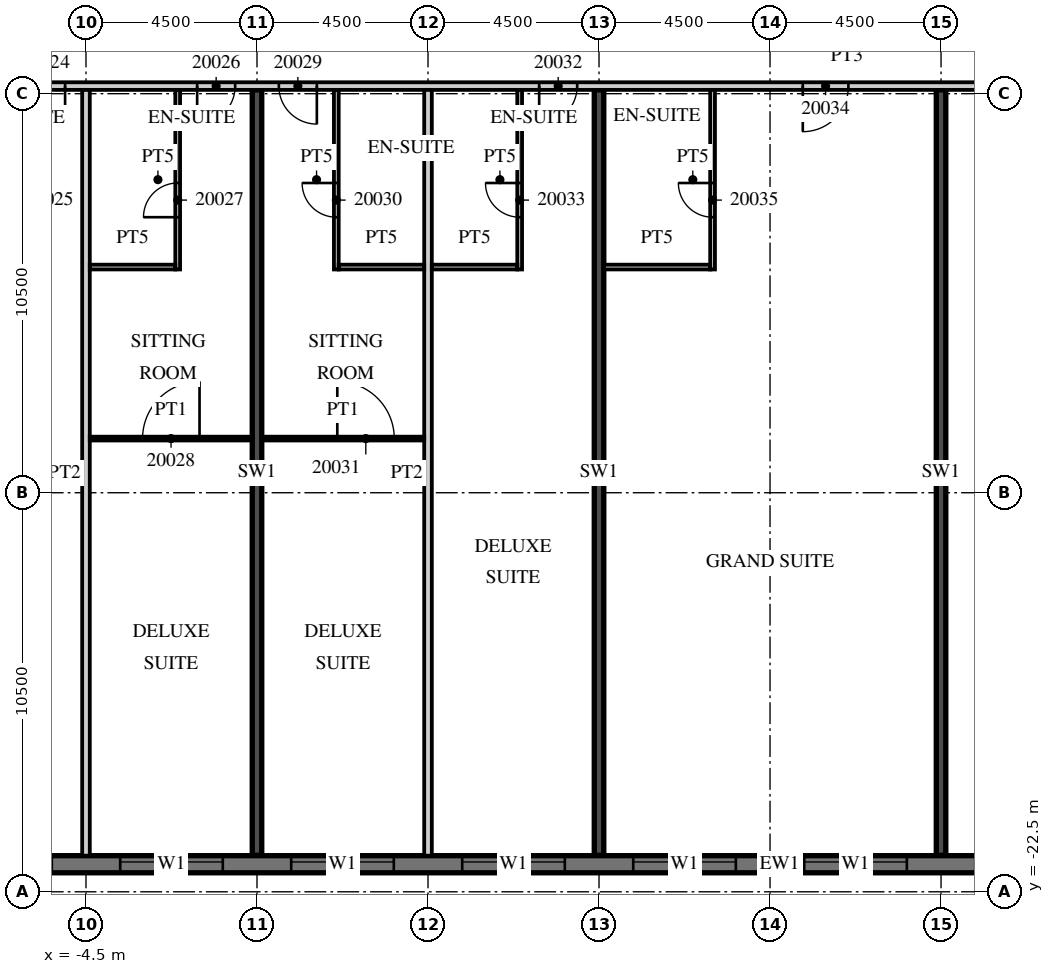
"""IFC4 building model, lengths in metres.
Left out: names, types, materials, properties, quantities, classifications, styles, units other than length and angle.
Written with IfcOpenShell. Run it as: python <this file> out.ifc"""

import sys

from ifc_helpers import new_model, si_unit, direction, frame, frame_2d, origin, place, context, subcontext, project, spatial, rectangle, extrude, element, fill, save


model = new_model("IFC4")
c1 = context("Model", 3, precision=1e-05, world=origin(), true_north=direction((0.0, 1.0)))
c2 = subcontext(c1, "Body", "Model", "MODEL_VIEW")
j1 = project(units=[si_unit("LENGTHUNIT", "METRE"), si_unit("PLANEANGLEUNIT", "RADIAN")], contexts=[c1])
p1 = place(None, origin())
s1 = spatial("IfcSite", under=j1, at=p1, CompositionType="ELEMENT")
p2 = place(p1, origin())
s2 = spatial("IfcBuilding", under=s1, at=p2, CompositionType="ELEMENT")
p3 = place(p2, frame((0.0, 0.0, 96.3)))
s3 = spatial("IfcBuildingStorey", under=s2, at=p3, CompositionType="ELEMENT", Elevation=96.3)
for number, where, z_axis, x_axis in (
    (1, (0.0, -21.54, 0.0), (0.0, 0.0, 1.0), (0.0, 1.0, 0.0)),
    (2, (9.0, -21.54, 0.0), (0.0, 0.0, 1.0), (0.0, 1.0, 0.0)),
    (3, (18.0, -21.54, 0.0), (0.0, 0.0, 1.0), (0.0, 1.0, 0.0)),
):
    element("IfcWall", number, at=place(p3, frame(where, z_axis=z_axis, x_axis=x_axis)), inside=s3, PredefinedType="SHEAR", context=c2, shape_type="SweptSolid", body=[
        extrude(rectangle(XDim=20.14, YDim=0.25, at=frame_2d((10.07, 0.0))), origin(), (0.0, 0.0, 1.0), 3.0),
    ])
p4 = place(p3, frame((-13.5, -21.775, 0.0), z_axis=(0.0, 0.0, 1.0), x_axis=(1.0, 0.0, 0.0)))
e4 = element("IfcWall", 4, at=p4, inside=s3, PredefinedType="SOLIDWALL", context=c2, shape_type="SweptSolid", body=[
    extrude(rectangle(XDim=54.5, YDim=0.45, at=frame_2d((27.25, 0.0))), origin(), (0.0, 0.0, 1.0), 3.0),
])
p5 = place(p4, frame((0.9, 0.0, 0.45)))
e5 = element("IfcOpeningElement", 5, at=p5, cuts=e4, PredefinedType="OPENING", context=c2, shape_type="SweptSolid", body=[
    extrude(rectangle(XDim=2.7, YDim=2.25, at=frame_2d((1.35, 1.125))), frame((0.0, 0.235, 0.0), z_axis=(0.0, -1.0, 0.0), x_axis=(1.0, 0.0, 0.0)), (0.0, 0.0, 1.0), 0.47),
])
p6 = place(p4, frame((5.4, 0.0, 0.45)))
e6 = element("IfcOpeningElement", 6, at=p6, cuts=e4, PredefinedType="OPENING", context=c2, shape_type="SweptSolid", body=[
    extrude(rectangle(XDim=2.7, YDim=2.25, at=frame_2d((1.35, 1.125))), frame((0.0, 0.235, 0.0), z_axis=(0.0, -1.0, 0.0), x_axis=(1.0, 0.0, 0.0)), (0.0, 0.0, 1.0), 0.47),
])
p7 = place(p4, frame((9.9, 0.0, 0.45)))
e7 = element("IfcOpeningElement", 7, at=p7, cuts=e4, PredefinedType="OPENING", context=c2, shape_type="SweptSolid", body=[
    extrude(rectangle(XDim=2.7, YDim=2.25, at=frame_2d((1.35, 1.125))), frame((0.0, 0.235, 0.0), z_axis=(0.0, -1.0, 0.0), x_axis=(1.0, 0.0, 0.0)), (0.0, 0.0, 1.0), 0.47),
])
p8 = place(p4, frame((14.4, 0.0, 0.45)))
e8 = element("IfcOpeningElement", 8, at=p8, cuts=e4, PredefinedType="OPENING", context=c2, shape_type="SweptSolid", body=[
    extrude(rectangle(XDim=2.7, YDim=2.25, at=frame_2d((1.35, 1.125))), frame((0.0, 0.235, 0.0), z_axis=(0.0, -1.0, 0.0), x_axis=(1.0, 0.0, 0.0)), (0.0, 0.0, 1.0), 0.47),
])
p9 = place(p4, frame((18.9, 0.0, 0.45)))
e9 = element("IfcOpeningElement", 9, at=p9, cuts=e4, PredefinedType="OPENING", context=c2, shape_type="SweptSolid", body=[
    extrude(rectangle(XDim=2.7, YDim=2.25, at=frame_2d((1.35, 1.125))), frame((0.0, 0.235, 0.0), z_axis=(0.0, -1.0, 0.0), x_axis=(1.0, 0.0, 0.0)), (0.0, 0.0, 1.0), 0.47),
])
p10 = place(p4, frame((23.4, 0.0, 0.45)))
e10 = element("IfcOpeningElement", 10, at=p10, cuts=e4, PredefinedType="OPENING", context=c2, shape_type="SweptSolid", body=[
    extrude(rectangle(XDim=2.7, YDim=2.25, at=frame_2d((1.35, 1.125))), frame((0.0, 0.235, 0.0), z_axis=(0.0, -1.0, 0.0), x_axis=(1.0, 0.0, 0.0)), (0.0, 0.0, 1.0), 0.47),
])
p11 = place(p4, frame((27.9, 0.0, 0.45)))
e11 = element("IfcOpeningElement", 11, at=p11, cuts=e4, PredefinedType="OPENING", context=c2, shape_type="SweptSolid", body=[
    extrude(rectangle(XDim=2.7, YDim=2.25, at=frame_2d((1.35, 1.125))), frame((0.0, 0.235, 0.0), z_axis=(0.0, -1.0, 0.0), x_axis=(1.0, 0.0, 0.0)), (0.0, 0.0, 1.0), 0.47),
])
p12 = place(p4, frame((32.4, 0.0, 0.45)))
e12 = element("IfcOpeningElement", 12, at=p12, cuts=e4, PredefinedType="OPENING", context=c2, shape_type="SweptSolid", body=[
    extrude(rectangle(XDim=2.7, YDim=2.25, at=frame_2d((1.35, 1.125))), frame((0.0, 0.235, 0.0), z_axis=(0.0, -1.0, 0.0), x_axis=(1.0, 0.0, 0.0)), (0.0, 0.0, 1.0), 0.47),
])
p13 = place(p4, frame((36.9, 0.0, 0.45)))
e13 = element("IfcOpeningElement", 13, at=p13, cuts=e4, PredefinedType="OPENING", context=c2, shape_type="SweptSolid", body=[
    extrude(rectangle(XDim=2.7, YDim=2.25, at=frame_2d((1.35, 1.125))), frame((0.0, 0.235, 0.0), z_axis=(0.0, -1.0, 0.0), x_axis=(1.0, 0.0, 0.0)), (0.0, 0.0, 1.0), 0.47),
])
p14 = place(p4, frame((41.4, 0.0, 0.45)))
e14 = element("IfcOpeningElement", 14, at=p14, cuts=e4, PredefinedType="OPENING", context=c2, shape_type="SweptSolid", body=[
    extrude(rectangle(XDim=2.7, YDim=2.25, at=frame_2d((1.35, 1.125))), frame((0.0, 0.235, 0.0), z_axis=(0.0, -1.0, 0.0), x_axis=(1.0, 0.0, 0.0)), (0.0, 0.0, 1.0), 0.47),
])
p15 = place(p4, frame((45.9, 0.0, 0.45)))
e15 = element("IfcOpeningElement", 15, at=p15, cuts=e4, PredefinedType="OPENING", context=c2, shape_type="SweptSolid", body=[
    extrude(rectangle(XDim=2.7, YDim=2.25, at=frame_2d((1.35, 1.125))), frame((0.0, 0.235, 0.0), z_axis=(0.0, -1.0, 0.0), x_axis=(1.0, 0.0, 0.0)), (0.0, 0.0, 1.0), 0.47),
])
p16 = place(p4, frame((50.4, 0.0, 0.45)))
e16 = element("IfcOpeningElement", 16, at=p16, cuts=e4, PredefinedType="OPENING", context=c2, shape_type="SweptSolid", body=[
    extrude(rectangle(XDim=2.7, YDim=2.25, at=frame_2d((1.35, 1.125))), frame((0.0, 0.235, 0.0), z_axis=(0.0, -1.0, 0.0), x_axis=(1.0, 0.0, 0.0)), (0.0, 0.0, 1.0), 0.47),
])
p17 = place(p3, frame((-13.5, -1.3, 0.0), z_axis=(0.0, 0.0, 1.0), x_axis=(1.0, 0.0, 0.0)))
e17 = element("IfcWall", 17, at=p17, inside=s3, PredefinedType="PARTITIONING", context=c2, shape_type="SweptSolid", body=[
    extrude(rectangle(XDim=58.05, YDim=0.2, at=frame_2d((29.025, 0.0))), origin(), (0.0, 0.0, 1.0), 3.0),
])
p18 = place(p17, frame((0.575, 0.0, 0.0)))
e18 = element("IfcOpeningElement", 18, at=p18, cuts=e17, PredefinedType="OPENING", context=c2, shape_type="SweptSolid", body=[
    extrude(rectangle(XDim=1.0, YDim=2.1, at=frame_2d((0.5, 1.05))), frame((0.0, 0.11, 0.0), z_axis=(0.0, -1.0, 0.0), x_axis=(1.0, 0.0, 0.0)), (0.0, 0.0, 1.0), 0.22),
])
p19 = place(p17, frame((7.45, 0.0, 0.0)))
e19 = element("IfcOpeningElement", 19, at=p19, cuts=e17, PredefinedType="OPENING", context=c2, shape_type="SweptSolid", body=[
    extrude(rectangle(XDim=1.0, YDim=2.1, at=frame_2d((0.5, 1.05))), frame((0.0, 0.11, 0.0), z_axis=(0.0, -1.0, 0.0), x_axis=(1.0, 0.0, 0.0)), (0.0, 0.0, 1.0), 0.22),
])
p20 = place(p17, frame((11.925, 0.0, 0.0)))
e20 = element("IfcOpeningElement", 20, at=p20, cuts=e17, PredefinedType="OPENING", context=c2, shape_type="SweptSolid", body=[
    extrude(rectangle(XDim=1.0, YDim=2.1, at=frame_2d((0.5, 1.05))), frame((0.0, 0.11, 0.0), z_axis=(0.0, -1.0, 0.0), x_axis=(1.0, 0.0, 0.0)), (0.0, 0.0, 1.0), 0.22),
])
p21 = place(p17, frame((14.075, 0.0, 0.0)))
e21 = element("IfcOpeningElement", 21, at=p21, cuts=e17, PredefinedType="OPENING", context=c2, shape_type="SweptSolid", body=[
    extrude(rectangle(XDim=1.0, YDim=2.1, at=frame_2d((0.5, 1.05))), frame((0.0, 0.11, 0.0), z_axis=(0.0, -1.0, 0.0), x_axis=(1.0, 0.0, 0.0)), (0.0, 0.0, 1.0), 0.22),
])
p22 = place(p17, frame((20.925, 0.0, 0.0)))
e22 = element("IfcOpeningElement", 22, at=p22, cuts=e17, PredefinedType="OPENING", context=c2, shape_type="SweptSolid", body=[
    extrude(rectangle(XDim=1.0, YDim=2.1, at=frame_2d((0.5, 1.05))), frame((0.0, 0.11, 0.0), z_axis=(0.0, -1.0, 0.0), x_axis=(1.0, 0.0, 0.0)), (0.0, 0.0, 1.0), 0.22),
])
p23 = place(p17, frame((27.862, 0.0, 0.0)))
e23 = element("IfcOpeningElement", 23, at=p23, cuts=e17, PredefinedType="OPENING", context=c2, shape_type="SweptSolid", body=[
    extrude(rectangle(XDim=1.2, YDim=2.1, at=frame_2d((0.6, 1.05))), frame((0.0, 0.11, 0.0), z_axis=(0.0, -1.0, 0.0), x_axis=(1.0, 0.0, 0.0)), (0.0, 0.0, 1.0), 0.22),
])
p24 = place(p17, frame((33.938, 0.0, 0.0)))
e24 = element("IfcOpeningElement", 24, at=p24, cuts=e17, PredefinedType="OPENING", context=c2, shape_type="SweptSolid", body=[
    extrude(rectangle(XDim=1.2, YDim=2.1, at=frame_2d((0.6, 1.05))), frame((0.0, 0.11, 0.0), z_axis=(0.0, -1.0, 0.0), x_axis=(1.0, 0.0, 0.0)), (0.0, 0.0, 1.0), 0.22),
])
p25 = place(p17, frame((45.862, 0.0, 0.0)))
e25 = element("IfcOpeningElement", 25, at=p25, cuts=e17, PredefinedType="OPENING", context=c2, shape_type="SweptSolid", body=[
    extrude(rectangle(XDim=1.2, YDim=2.1, at=frame_2d((0.6, 1.05))), frame((0.0, 0.11, 0.0), z_axis=(0.0, -1.0, 0.0), x_axis=(1.0, 0.0, 0.0)), (0.0, 0.0, 1.0), 0.22),
])
p26 = place(p17, frame((52.425, 0.0, 0.0)))
e26 = element("IfcOpeningElement", 26, at=p26, cuts=e17, PredefinedType="OPENING", context=c2, shape_type="SweptSolid", body=[
    extrude(rectangle(XDim=1.0, YDim=2.1, at=frame_2d((0.5, 1.05))), frame((0.0, 0.11, 0.0), z_axis=(0.0, -1.0, 0.0), x_axis=(1.0, 0.0, 0.0)), (0.0, 0.0, 1.0), 0.22),
])
p27 = place(p17, frame((56.525, 0.0, 0.0)))
e27 = element("IfcOpeningElement", 27, at=p27, cuts=e17, PredefinedType="OPENING", context=c2, shape_type="SweptSolid", body=[
    extrude(rectangle(XDim=1.0, YDim=2.1, at=frame_2d((0.5, 1.05))), frame((0.0, 0.11, 0.0), z_axis=(0.0, -1.0, 0.0), x_axis=(1.0, 0.0, 0.0)), (0.0, 0.0, 1.0), 0.22),
])
p28 = place(p3, frame((-4.5, -21.55, 0.0), z_axis=(0.0, 0.0, 1.0), x_axis=(0.0, 1.0, 0.0)))
e28 = element("IfcWall", 28, at=p28, inside=s3, PredefinedType="PARTITIONING", context=c2, shape_type="SweptSolid", body=[
    extrude(rectangle(XDim=20.15, YDim=0.2, at=frame_2d((10.075, 0.0))), origin(), (0.0, 0.0, 1.0), 3.0),
])
p29 = place(p3, frame((-2.087, -6.125, 0.0), z_axis=(0.0, 0.0, 1.0), x_axis=(0.0, 1.0, 0.0)))
e29 = element("IfcWall", 29, at=p29, inside=s3, PredefinedType="PARTITIONING", context=c2, shape_type="SweptSolid", body=[
    extrude(rectangle(XDim=4.725, YDim=0.125, at=frame_2d((2.363, 0.0))), origin(), (0.0, 0.0, 1.0), 3.0),
])
p30 = place(p29, frame((1.375, 0.0, 0.0)))
e30 = element("IfcOpeningElement", 30, at=p30, cuts=e29, PredefinedType="OPENING", context=c2, shape_type="SweptSolid", body=[
    extrude(rectangle(XDim=0.9, YDim=2.1, at=frame_2d((0.45, 1.05))), frame((0.0, 0.073, 0.0), z_axis=(0.0, -1.0, 0.0), x_axis=(1.0, 0.0, 0.0)), (0.0, 0.0, 1.0), 0.145),
])
p31 = place(p3, frame((-4.4, -6.062, 0.0), z_axis=(0.0, 0.0, 1.0), x_axis=(1.0, 0.0, 0.0)))
e31 = element("IfcWall", 31, at=p31, inside=s3, PredefinedType="PARTITIONING", context=c2, shape_type="SweptSolid", body=[
    extrude(rectangle(XDim=2.25, YDim=0.125, at=frame_2d((1.125, 0.0))), origin(), (0.0, 0.0, 1.0), 3.0),
])
p32 = place(p3, frame((-4.4, -10.575, 0.0), z_axis=(0.0, 0.0, 1.0), x_axis=(1.0, 0.0, 0.0)))
e32 = element("IfcWall", 32, at=p32, inside=s3, PredefinedType="PARTITIONING", context=c2, shape_type="SweptSolid", body=[
    extrude(rectangle(XDim=4.275, YDim=0.1, at=frame_2d((2.137, 0.0))), origin(), (0.0, 0.0, 1.0), 3.0),
])
p33 = place(p32, frame((1.388, 0.0, 0.0)))
e33 = element("IfcOpeningElement", 33, at=p33, cuts=e32, PredefinedType="OPENING", context=c2, shape_type="SweptSolid", body=[
    extrude(rectangle(XDim=1.5, YDim=2.1, at=frame_2d((0.75, 1.05))), frame((0.0, 0.06, 0.0), z_axis=(0.0, -1.0, 0.0), x_axis=(1.0, 0.0, 0.0)), (0.0, 0.0, 1.0), 0.12),
])
p34 = place(p3, frame((4.5, -21.55, 0.0), z_axis=(0.0, 0.0, 1.0), x_axis=(0.0, 1.0, 0.0)))
e34 = element("IfcWall", 34, at=p34, inside=s3, PredefinedType="PARTITIONING", context=c2, shape_type="SweptSolid", body=[
    extrude(rectangle(XDim=20.15, YDim=0.2, at=frame_2d((10.075, 0.0))), origin(), (0.0, 0.0, 1.0), 3.0),
])
p35 = place(p3, frame((2.087, -6.125, 0.0), z_axis=(0.0, 0.0, 1.0), x_axis=(0.0, 1.0, 0.0)))
e35 = element("IfcWall", 35, at=p35, inside=s3, PredefinedType="PARTITIONING", context=c2, shape_type="SweptSolid", body=[
    extrude(rectangle(XDim=4.725, YDim=0.125, at=frame_2d((2.363, 0.0))), origin(), (0.0, 0.0, 1.0), 3.0),
])
p36 = place(p35, frame((1.375, 0.0, 0.0)))
e36 = element("IfcOpeningElement", 36, at=p36, cuts=e35, PredefinedType="OPENING", context=c2, shape_type="SweptSolid", body=[
    extrude(rectangle(XDim=0.9, YDim=2.1, at=frame_2d((0.45, 1.05))), frame((0.0, 0.073, 0.0), z_axis=(0.0, -1.0, 0.0), x_axis=(1.0, 0.0, 0.0)), (0.0, 0.0, 1.0), 0.145),
])
p37 = place(p3, frame((2.15, -6.062, 0.0), z_axis=(0.0, 0.0, 1.0), x_axis=(1.0, 0.0, 0.0)))
e37 = element("IfcWall", 37, at=p37, inside=s3, PredefinedType="PARTITIONING", context=c2, shape_type="SweptSolid", body=[
    extrude(rectangle(XDim=2.25, YDim=0.125, at=frame_2d((1.125, 0.0))), origin(), (0.0, 0.0, 1.0), 3.0),
])
p38 = place(p3, frame((0.125, -10.575, 0.0), z_axis=(0.0, 0.0, 1.0), x_axis=(1.0, 0.0, 0.0)))
e38 = element("IfcWall", 38, at=p38, inside=s3, PredefinedType="PARTITIONING", context=c2, shape_type="SweptSolid", body=[
    extrude(rectangle(XDim=4.275, YDim=0.1, at=frame_2d((2.137, 0.0))), origin(), (0.0, 0.0, 1.0), 3.0),
])
p39 = place(p38, frame((1.988, 0.0, 0.0)))
e39 = element("IfcOpeningElement", 39, at=p39, cuts=e38, PredefinedType="OPENING", context=c2, shape_type="SweptSolid", body=[
    extrude(rectangle(XDim=1.5, YDim=2.1, at=frame_2d((0.75, 1.05))), frame((0.0, 0.06, 0.0), z_axis=(0.0, -1.0, 0.0), x_axis=(1.0, 0.0, 0.0)), (0.0, 0.0, 1.0), 0.12),
])
p40 = place(p3, frame((6.912, -6.125, 0.0), z_axis=(0.0, 0.0, 1.0), x_axis=(0.0, 1.0, 0.0)))
e40 = element("IfcWall", 40, at=p40, inside=s3, PredefinedType="PARTITIONING", context=c2, shape_type="SweptSolid", body=[
    extrude(rectangle(XDim=4.725, YDim=0.125, at=frame_2d((2.363, 0.0))), origin(), (0.0, 0.0, 1.0), 3.0),
])
p41 = place(p40, frame((1.375, 0.0, 0.0)))
e41 = element("IfcOpeningElement", 41, at=p41, cuts=e40, PredefinedType="OPENING", context=c2, shape_type="SweptSolid", body=[
    extrude(rectangle(XDim=0.9, YDim=2.1, at=frame_2d((0.45, 1.05))), frame((0.0, 0.073, 0.0), z_axis=(0.0, -1.0, 0.0), x_axis=(1.0, 0.0, 0.0)), (0.0, 0.0, 1.0), 0.145),
])
p42 = place(p3, frame((4.6, -6.062, 0.0), z_axis=(0.0, 0.0, 1.0), x_axis=(1.0, 0.0, 0.0)))
e42 = element("IfcWall", 42, at=p42, inside=s3, PredefinedType="PARTITIONING", context=c2, shape_type="SweptSolid", body=[
    extrude(rectangle(XDim=2.25, YDim=0.125, at=frame_2d((1.125, 0.0))), origin(), (0.0, 0.0, 1.0), 3.0),
])
p43 = place(p3, frame((11.988, -6.125, 0.0), z_axis=(0.0, 0.0, 1.0), x_axis=(0.0, 1.0, 0.0)))
e43 = element("IfcWall", 43, at=p43, inside=s3, PredefinedType="PARTITIONING", context=c2, shape_type="SweptSolid", body=[
    extrude(rectangle(XDim=4.725, YDim=0.125, at=frame_2d((2.363, 0.0))), origin(), (0.0, 0.0, 1.0), 3.0),
])
p44 = place(p43, frame((1.375, 0.0, 0.0)))
e44 = element("IfcOpeningElement", 44, at=p44, cuts=e43, PredefinedType="OPENING", context=c2, shape_type="SweptSolid", body=[
    extrude(rectangle(XDim=0.9, YDim=2.1, at=frame_2d((0.45, 1.05))), frame((0.0, 0.073, 0.0), z_axis=(0.0, -1.0, 0.0), x_axis=(1.0, 0.0, 0.0)), (0.0, 0.0, 1.0), 0.145),
])
p45 = place(p3, frame((9.125, -6.062, 0.0), z_axis=(0.0, 0.0, 1.0), x_axis=(1.0, 0.0, 0.0)))
e45 = element("IfcWall", 45, at=p45, inside=s3, PredefinedType="PARTITIONING", context=c2, shape_type="SweptSolid", body=[
    extrude(rectangle(XDim=2.8, YDim=0.125, at=frame_2d((1.4, 0.0))), origin(), (0.0, 0.0, 1.0), 3.0),
])
p46 = place(p7, origin())
e46 = element("IfcWindow", 46, at=p46, inside=s3, PartitioningType="SINGLE_PANEL", PredefinedType="WINDOW", context=c2, shape_type="SweptSolid", body=[
    extrude(rectangle(XDim=2.7, YDim=2.25, at=frame_2d((1.35, 1.125))), frame((0.0, 0.09, 0.0), z_axis=(0.0, -1.0, 0.0), x_axis=(1.0, 0.0, 0.0)), (0.0, 0.0, 1.0), 0.06),
])
fill(e7, e46)
p47 = place(p8, origin())
e47 = element("IfcWindow", 47, at=p47, inside=s3, PartitioningType="SINGLE_PANEL", PredefinedType="WINDOW", context=c2, shape_type="SweptSolid", body=[
    extrude(rectangle(XDim=2.7, YDim=2.25, at=frame_2d((1.35, 1.125))), frame((0.0, 0.09, 0.0), z_axis=(0.0, -1.0, 0.0), x_axis=(1.0, 0.0, 0.0)), (0.0, 0.0, 1.0), 0.06),
])
fill(e8, e47)
p48 = place(p9, origin())
e48 = element("IfcWindow", 48, at=p48, inside=s3, PartitioningType="SINGLE_PANEL", PredefinedType="WINDOW", context=c2, shape_type="SweptSolid", body=[
    extrude(rectangle(XDim=2.7, YDim=2.25, at=frame_2d((1.35, 1.125))), frame((0.0, 0.09, 0.0), z_axis=(0.0, -1.0, 0.0), x_axis=(1.0, 0.0, 0.0)), (0.0, 0.0, 1.0), 0.06),
])
fill(e9, e48)
p49 = place(p10, origin())
e49 = element("IfcWindow", 49, at=p49, inside=s3, PartitioningType="SINGLE_PANEL", PredefinedType="WINDOW", context=c2, shape_type="SweptSolid", body=[
    extrude(rectangle(XDim=2.7, YDim=2.25, at=frame_2d((1.35, 1.125))), frame((0.0, 0.09, 0.0), z_axis=(0.0, -1.0, 0.0), x_axis=(1.0, 0.0, 0.0)), (0.0, 0.0, 1.0), 0.06),
])
fill(e10, e49)
p50 = place(p11, origin())
e50 = element("IfcWindow", 50, at=p50, inside=s3, PartitioningType="SINGLE_PANEL", PredefinedType="WINDOW", context=c2, shape_type="SweptSolid", body=[
    extrude(rectangle(XDim=2.7, YDim=2.25, at=frame_2d((1.35, 1.125))), frame((0.0, 0.09, 0.0), z_axis=(0.0, -1.0, 0.0), x_axis=(1.0, 0.0, 0.0)), (0.0, 0.0, 1.0), 0.06),
])
fill(e11, e50)
p51 = place(p19, origin())
e51 = element("IfcDoor", 51, at=p51, inside=s3, OperationType="SINGLE_SWING_RIGHT", PredefinedType="DOOR", context=c2, shape_type="SweptSolid", body=[
    extrude(rectangle(XDim=1.0, YDim=2.1, at=frame_2d((0.5, 1.05))), frame((0.0, 0.025, 0.0), z_axis=(0.0, -1.0, 0.0), x_axis=(1.0, 0.0, 0.0)), (0.0, 0.0, 1.0), 0.05),
])
fill(e19, e51)
p52 = place(p20, origin())
e52 = element("IfcDoor", 52, at=p52, inside=s3, OperationType="SINGLE_SWING_LEFT", PredefinedType="DOOR", context=c2, shape_type="SweptSolid", body=[
    extrude(rectangle(XDim=1.0, YDim=2.1, at=frame_2d((0.5, 1.05))), frame((0.0, 0.025, 0.0), z_axis=(0.0, -1.0, 0.0), x_axis=(1.0, 0.0, 0.0)), (0.0, 0.0, 1.0), 0.05),
])
fill(e20, e52)
p53 = place(p30, origin())
e53 = element("IfcDoor", 53, at=p53, inside=s3, OperationType="SINGLE_SWING_LEFT", PredefinedType="DOOR", context=c2, shape_type="SweptSolid", body=[
    extrude(rectangle(XDim=0.9, YDim=2.1, at=frame_2d((0.45, 1.05))), frame((0.0, 0.025, 0.0), z_axis=(0.0, -1.0, 0.0), x_axis=(1.0, 0.0, 0.0)), (0.0, 0.0, 1.0), 0.05),
])
fill(e30, e53)
p54 = place(p33, origin())
e54 = element("IfcDoor", 54, at=p54, inside=s3, OperationType="SINGLE_SWING_RIGHT", PredefinedType="DOOR", context=c2, shape_type="SweptSolid", body=[
    extrude(rectangle(XDim=1.5, YDim=2.1, at=frame_2d((0.75, 1.05))), frame((0.0, 0.025, 0.0), z_axis=(0.0, -1.0, 0.0), x_axis=(1.0, 0.0, 0.0)), (0.0, 0.0, 1.0), 0.05),
])
fill(e33, e54)
p55 = place(p21, origin())
e55 = element("IfcDoor", 55, at=p55, inside=s3, OperationType="SINGLE_SWING_RIGHT", PredefinedType="DOOR", context=c2, shape_type="SweptSolid", body=[
    extrude(rectangle(XDim=1.0, YDim=2.1, at=frame_2d((0.5, 1.05))), frame((0.0, 0.025, 0.0), z_axis=(0.0, -1.0, 0.0), x_axis=(1.0, 0.0, 0.0)), (0.0, 0.0, 1.0), 0.05),
])
fill(e21, e55)
p56 = place(p36, origin())
e56 = element("IfcDoor", 56, at=p56, inside=s3, OperationType="SINGLE_SWING_RIGHT", PredefinedType="DOOR", context=c2, shape_type="SweptSolid", body=[
    extrude(rectangle(XDim=0.9, YDim=2.1, at=frame_2d((0.45, 1.05))), frame((0.0, 0.025, 0.0), z_axis=(0.0, -1.0, 0.0), x_axis=(1.0, 0.0, 0.0)), (0.0, 0.0, 1.0), 0.05),
])
fill(e36, e56)
p57 = place(p39, origin())
e57 = element("IfcDoor", 57, at=p57, inside=s3, OperationType="SINGLE_SWING_LEFT", PredefinedType="DOOR", context=c2, shape_type="SweptSolid", body=[
    extrude(rectangle(XDim=1.5, YDim=2.1, at=frame_2d((0.75, 1.05))), frame((0.0, 0.025, 0.0), z_axis=(0.0, -1.0, 0.0), x_axis=(1.0, 0.0, 0.0)), (0.0, 0.0, 1.0), 0.05),
])
fill(e39, e57)
p58 = place(p22, origin())
e58 = element("IfcDoor", 58, at=p58, inside=s3, OperationType="SINGLE_SWING_LEFT", PredefinedType="DOOR", context=c2, shape_type="SweptSolid", body=[
    extrude(rectangle(XDim=1.0, YDim=2.1, at=frame_2d((0.5, 1.05))), frame((0.0, 0.025, 0.0), z_axis=(0.0, -1.0, 0.0), x_axis=(1.0, 0.0, 0.0)), (0.0, 0.0, 1.0), 0.05),
])
fill(e22, e58)
p59 = place(p41, origin())
e59 = element("IfcDoor", 59, at=p59, inside=s3, OperationType="SINGLE_SWING_RIGHT", PredefinedType="DOOR", context=c2, shape_type="SweptSolid", body=[
    extrude(rectangle(XDim=0.9, YDim=2.1, at=frame_2d((0.45, 1.05))), frame((0.0, 0.025, 0.0), z_axis=(0.0, -1.0, 0.0), x_axis=(1.0, 0.0, 0.0)), (0.0, 0.0, 1.0), 0.05),
])
fill(e41, e59)
p60 = place(p23, origin())
e60 = element("IfcDoor", 60, at=p60, inside=s3, OperationType="SINGLE_SWING_LEFT", PredefinedType="DOOR", context=c2, shape_type="SweptSolid", body=[
    extrude(rectangle(XDim=1.2, YDim=2.1, at=frame_2d((0.6, 1.05))), frame((0.0, 0.025, 0.0), z_axis=(0.0, -1.0, 0.0), x_axis=(1.0, 0.0, 0.0)), (0.0, 0.0, 1.0), 0.05),
])
fill(e23, e60)
p61 = place(p44, origin())
e61 = element("IfcDoor", 61, at=p61, inside=s3, OperationType="SINGLE_SWING_RIGHT", PredefinedType="DOOR", context=c2, shape_type="SweptSolid", body=[
    extrude(rectangle(XDim=0.9, YDim=2.1, at=frame_2d((0.45, 1.05))), frame((0.0, 0.025, 0.0), z_axis=(0.0, -1.0, 0.0), x_axis=(1.0, 0.0, 0.0)), (0.0, 0.0, 1.0), 0.05),
])
fill(e44, e61)
save(model, sys.argv[1])
